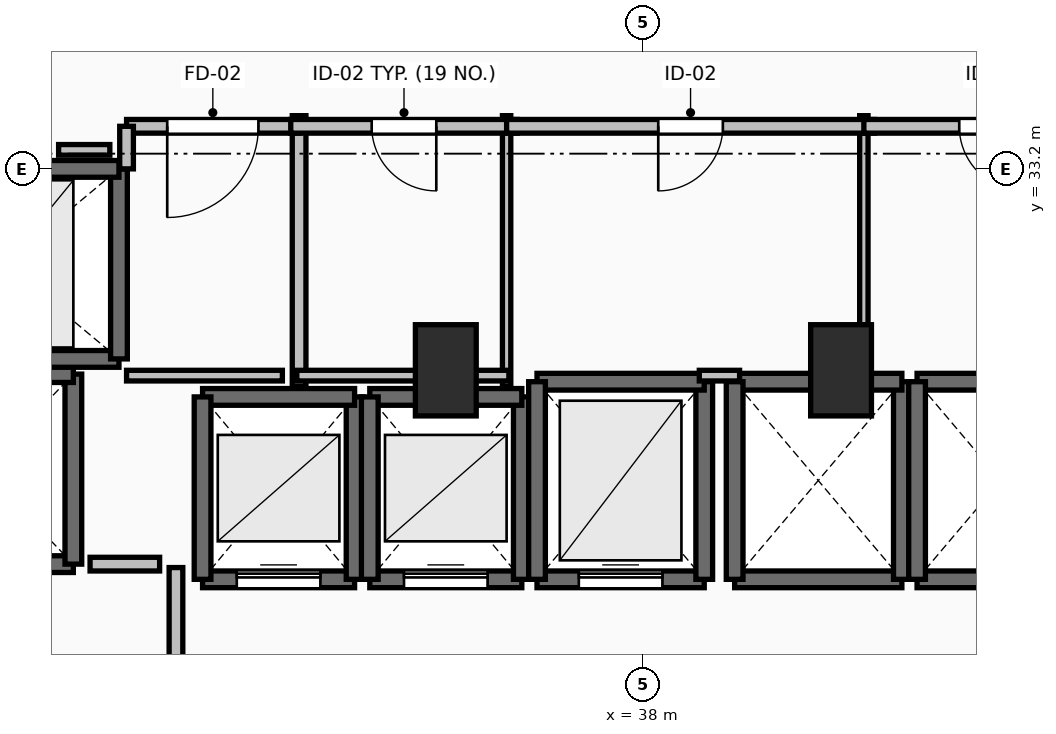
"""IFC4 building model, lengths in metres.
Left out: names, types, materials, properties, quantities, classifications, styles, units other than length and angle.
Written with IfcOpenShell. Run it as: python <this file> out.ifc"""

import sys

from ifc_helpers import new_model, si_unit, direction, frame, frame_2d, origin, origin_2d, place, context, subcontext, project, spatial, rectangle, extrude, element, fill, save


model = new_model("IFC4")
c1 = context("Model", 3, precision=1e-05, world=origin(), true_north=direction((0.0, 1.0)))
c2 = subcontext(c1, "Body", "Model", "MODEL_VIEW")
j1 = project(units=[si_unit("LENGTHUNIT", "METRE"), si_unit("PLANEANGLEUNIT", "RADIAN")], contexts=[c1])
p1 = place(None, origin())
s1 = spatial("IfcSite", under=j1, at=p1, CompositionType="ELEMENT")
p2 = place(p1, origin())
s2 = spatial("IfcBuilding", under=s1, at=p2, CompositionType="ELEMENT")
p3 = place(p2, frame((0.0, 0.0, 27.5)))
s3 = spatial("IfcBuildingStorey", under=s2, at=p3, CompositionType="ELEMENT", Elevation=27.5)
for number, where, z_axis, x_axis in (
    (1, (35.4, 30.55, 0.0), (0.0, 0.0, 1.0), (1.0, 0.0, 0.0)),
    (2, (40.6, 30.55, 0.0), (0.0, 0.0, 1.0), (1.0, 0.0, 0.0)),
):
    element("IfcColumn", number, at=place(p3, frame(where, z_axis=z_axis, x_axis=x_axis)), inside=s3, PredefinedType="PILASTER", context=c2, shape_type="SweptSolid", body=[
        extrude(rectangle(XDim=0.8, YDim=1.2, at=origin_2d()), origin(), (0.0, 0.0, 1.0), 3.5),
    ])
p4 = place(p3, frame((32.2, 27.8, 0.0), z_axis=(0.0, 0.0, 1.0), x_axis=(1.0, 0.0, 0.0)))
e3 = element("IfcWall", 3, at=p4, inside=s3, PredefinedType="SOLIDWALL", context=c2, shape_type="SweptSolid", body=[
    extrude(rectangle(XDim=2.0, YDim=0.22, at=frame_2d((1.0, 0.0))), origin(), (0.0, 0.0, 1.0), 3.24),
])
p5 = place(p4, frame((0.45, 0.0, 0.0)))
e4 = element("IfcOpeningElement", 4, at=p5, cuts=e3, PredefinedType="OPENING", context=c2, shape_type="SweptSolid", body=[
    extrude(rectangle(XDim=1.1, YDim=2.2, at=frame_2d((0.55, 1.1))), frame((0.0, 0.125, 0.0), z_axis=(0.0, -1.0, 0.0), x_axis=(1.0, 0.0, 0.0)), (0.0, 0.0, 1.0), 0.25),
])
p6 = place(p3, frame((34.2, 27.8, 0.0), z_axis=(0.0, 0.0, 1.0), x_axis=(0.0, 1.0, 0.0)))
e5 = element("IfcWall", 5, at=p6, inside=s3, PredefinedType="SOLIDWALL", context=c2, shape_type="SweptSolid", body=[
    extrude(rectangle(XDim=2.4, YDim=0.22, at=frame_2d((1.2, 0.0))), origin(), (0.0, 0.0, 1.0), 3.24),
])
p7 = place(p3, frame((34.2, 30.2, 0.0), z_axis=(0.0, 0.0, 1.0), x_axis=(-1.0, 0.0, 0.0)))
e6 = element("IfcWall", 6, at=p7, inside=s3, PredefinedType="SOLIDWALL", context=c2, shape_type="SweptSolid", body=[
    extrude(rectangle(XDim=2.0, YDim=0.22, at=frame_2d((1.0, 0.0))), origin(), (0.0, 0.0, 1.0), 3.24),
])
p8 = place(p3, frame((32.2, 30.2, 0.0), z_axis=(0.0, 0.0, 1.0), x_axis=(0.0, -1.0, 0.0)))
e7 = element("IfcWall", 7, at=p8, inside=s3, PredefinedType="SOLIDWALL", context=c2, shape_type="SweptSolid", body=[
    extrude(rectangle(XDim=2.4, YDim=0.22, at=frame_2d((1.2, 0.0))), origin(), (0.0, 0.0, 1.0), 3.24),
])
p9 = place(p3, frame((34.4, 27.8, 0.0), z_axis=(0.0, 0.0, 1.0), x_axis=(1.0, 0.0, 0.0)))
e8 = element("IfcWall", 8, at=p9, inside=s3, PredefinedType="SOLIDWALL", context=c2, shape_type="SweptSolid", body=[
    extrude(rectangle(XDim=2.0, YDim=0.22, at=frame_2d((1.0, 0.0))), origin(), (0.0, 0.0, 1.0), 3.24),
])
p10 = place(p9, frame((0.45, 0.0, 0.0)))
e9 = element("IfcOpeningElement", 9, at=p10, cuts=e8, PredefinedType="OPENING", context=c2, shape_type="SweptSolid", body=[
    extrude(rectangle(XDim=1.1, YDim=2.2, at=frame_2d((0.55, 1.1))), frame((0.0, 0.125, 0.0), z_axis=(0.0, -1.0, 0.0), x_axis=(1.0, 0.0, 0.0)), (0.0, 0.0, 1.0), 0.25),
])
p11 = place(p3, frame((36.4, 27.8, 0.0), z_axis=(0.0, 0.0, 1.0), x_axis=(0.0, 1.0, 0.0)))
e10 = element("IfcWall", 10, at=p11, inside=s3, PredefinedType="SOLIDWALL", context=c2, shape_type="SweptSolid", body=[
    extrude(rectangle(XDim=2.4, YDim=0.22, at=frame_2d((1.2, 0.0))), origin(), (0.0, 0.0, 1.0), 3.24),
])
p12 = place(p3, frame((36.4, 30.2, 0.0), z_axis=(0.0, 0.0, 1.0), x_axis=(-1.0, 0.0, 0.0)))
e11 = element("IfcWall", 11, at=p12, inside=s3, PredefinedType="SOLIDWALL", context=c2, shape_type="SweptSolid", body=[
    extrude(rectangle(XDim=2.0, YDim=0.22, at=frame_2d((1.0, 0.0))), origin(), (0.0, 0.0, 1.0), 3.24),
])
p13 = place(p3, frame((34.4, 30.2, 0.0), z_axis=(0.0, 0.0, 1.0), x_axis=(0.0, -1.0, 0.0)))
e12 = element("IfcWall", 12, at=p13, inside=s3, PredefinedType="SOLIDWALL", context=c2, shape_type="SweptSolid", body=[
    extrude(rectangle(XDim=2.4, YDim=0.22, at=frame_2d((1.2, 0.0))), origin(), (0.0, 0.0, 1.0), 3.24),
])
p14 = place(p3, frame((36.6, 27.8, 0.0), z_axis=(0.0, 0.0, 1.0), x_axis=(1.0, 0.0, 0.0)))
e13 = element("IfcWall", 13, at=p14, inside=s3, PredefinedType="SOLIDWALL", context=c2, shape_type="SweptSolid", body=[
    extrude(rectangle(XDim=2.2, YDim=0.22, at=frame_2d((1.1, 0.0))), origin(), (0.0, 0.0, 1.0), 3.24),
])
p15 = place(p14, frame((0.55, 0.0, 0.0)))
e14 = element("IfcOpeningElement", 14, at=p15, cuts=e13, PredefinedType="OPENING", context=c2, shape_type="SweptSolid", body=[
    extrude(rectangle(XDim=1.1, YDim=2.2, at=frame_2d((0.55, 1.1))), frame((0.0, 0.125, 0.0), z_axis=(0.0, -1.0, 0.0), x_axis=(1.0, 0.0, 0.0)), (0.0, 0.0, 1.0), 0.25),
])
p16 = place(p3, frame((38.8, 27.8, 0.0), z_axis=(0.0, 0.0, 1.0), x_axis=(0.0, 1.0, 0.0)))
e15 = element("IfcWall", 15, at=p16, inside=s3, PredefinedType="SOLIDWALL", context=c2, shape_type="SweptSolid", body=[
    extrude(rectangle(XDim=2.6, YDim=0.22, at=frame_2d((1.3, 0.0))), origin(), (0.0, 0.0, 1.0), 3.24),
])
p17 = place(p3, frame((38.8, 30.4, 0.0), z_axis=(0.0, 0.0, 1.0), x_axis=(-1.0, 0.0, 0.0)))
e16 = element("IfcWall", 16, at=p17, inside=s3, PredefinedType="SOLIDWALL", context=c2, shape_type="SweptSolid", body=[
    extrude(rectangle(XDim=2.2, YDim=0.22, at=frame_2d((1.1, 0.0))), origin(), (0.0, 0.0, 1.0), 3.24),
])
p18 = place(p3, frame((36.6, 30.4, 0.0), z_axis=(0.0, 0.0, 1.0), x_axis=(0.0, -1.0, 0.0)))
e17 = element("IfcWall", 17, at=p18, inside=s3, PredefinedType="SOLIDWALL", context=c2, shape_type="SweptSolid", body=[
    extrude(rectangle(XDim=2.6, YDim=0.22, at=frame_2d((1.3, 0.0))), origin(), (0.0, 0.0, 1.0), 3.24),
])
p19 = place(p3, frame((39.2, 27.8, 0.0), z_axis=(0.0, 0.0, 1.0), x_axis=(1.0, 0.0, 0.0)))
e18 = element("IfcWall", 18, at=p19, inside=s3, PredefinedType="SOLIDWALL", context=c2, shape_type="SweptSolid", body=[
    extrude(rectangle(XDim=2.2, YDim=0.22, at=frame_2d((1.1, 0.0))), origin(), (0.0, 0.0, 1.0), 3.24),
])
p20 = place(p3, frame((41.4, 27.8, 0.0), z_axis=(0.0, 0.0, 1.0), x_axis=(0.0, 1.0, 0.0)))
e19 = element("IfcWall", 19, at=p20, inside=s3, PredefinedType="SOLIDWALL", context=c2, shape_type="SweptSolid", body=[
    extrude(rectangle(XDim=2.6, YDim=0.22, at=frame_2d((1.3, 0.0))), origin(), (0.0, 0.0, 1.0), 3.24),
])
p21 = place(p3, frame((41.4, 30.4, 0.0), z_axis=(0.0, 0.0, 1.0), x_axis=(-1.0, 0.0, 0.0)))
e20 = element("IfcWall", 20, at=p21, inside=s3, PredefinedType="SOLIDWALL", context=c2, shape_type="SweptSolid", body=[
    extrude(rectangle(XDim=2.2, YDim=0.22, at=frame_2d((1.1, 0.0))), origin(), (0.0, 0.0, 1.0), 3.24),
])
p22 = place(p3, frame((39.2, 30.4, 0.0), z_axis=(0.0, 0.0, 1.0), x_axis=(0.0, -1.0, 0.0)))
e21 = element("IfcWall", 21, at=p22, inside=s3, PredefinedType="SOLIDWALL", context=c2, shape_type="SweptSolid", body=[
    extrude(rectangle(XDim=2.6, YDim=0.22, at=frame_2d((1.3, 0.0))), origin(), (0.0, 0.0, 1.0), 3.24),
])
for number, where, z_axis, x_axis in (
    (22, (41.6, 27.8, 0.0), (0.0, 0.0, 1.0), (1.0, 0.0, 0.0)),
    (23, (43.8, 30.4, 0.0), (0.0, 0.0, 1.0), (-1.0, 0.0, 0.0)),
):
    element("IfcWall", number, at=place(p3, frame(where, z_axis=z_axis, x_axis=x_axis)), inside=s3, PredefinedType="SOLIDWALL", context=c2, shape_type="SweptSolid", body=[
        extrude(rectangle(XDim=2.2, YDim=0.22, at=frame_2d((1.1, 0.0))), origin(), (0.0, 0.0, 1.0), 3.24),
    ])
p23 = place(p3, frame((41.6, 30.4, 0.0), z_axis=(0.0, 0.0, 1.0), x_axis=(0.0, -1.0, 0.0)))
e24 = element("IfcWall", 24, at=p23, inside=s3, PredefinedType="SOLIDWALL", context=c2, shape_type="SweptSolid", body=[
    extrude(rectangle(XDim=2.6, YDim=0.22, at=frame_2d((1.3, 0.0))), origin(), (0.0, 0.0, 1.0), 3.24),
])
p24 = place(p3, frame((28.1, 28.0, 0.0), z_axis=(0.0, 0.0, 1.0), x_axis=(1.0, 0.0, 0.0)))
e25 = element("IfcWall", 25, at=p24, inside=s3, PredefinedType="SHEAR", context=c2, shape_type="SweptSolid", body=[
    extrude(rectangle(XDim=2.4, YDim=0.22, at=frame_2d((1.2, 0.0))), origin(), (0.0, 0.0, 1.0), 3.24),
])
p25 = place(p24, frame((0.6, 0.0, 0.0)))
e26 = element("IfcOpeningElement", 26, at=p25, cuts=e25, PredefinedType="OPENING", context=c2, shape_type="SweptSolid", body=[
    extrude(rectangle(XDim=1.2, YDim=2.2, at=frame_2d((0.6, 1.1))), frame((0.0, 0.125, 0.0), z_axis=(0.0, -1.0, 0.0), x_axis=(1.0, 0.0, 0.0)), (0.0, 0.0, 1.0), 0.25),
])
p26 = place(p3, frame((30.5, 28.0, 0.0), z_axis=(0.0, 0.0, 1.0), x_axis=(0.0, 1.0, 0.0)))
e27 = element("IfcWall", 27, at=p26, inside=s3, PredefinedType="SHEAR", context=c2, shape_type="SweptSolid", body=[
    extrude(rectangle(XDim=2.5, YDim=0.22, at=frame_2d((1.25, 0.0))), origin(), (0.0, 0.0, 1.0), 3.24),
])
p27 = place(p3, frame((30.5, 30.5, 0.0), z_axis=(0.0, 0.0, 1.0), x_axis=(-1.0, 0.0, 0.0)))
e28 = element("IfcWall", 28, at=p27, inside=s3, PredefinedType="SHEAR", context=c2, shape_type="SweptSolid", body=[
    extrude(rectangle(XDim=2.4, YDim=0.22, at=frame_2d((1.2, 0.0))), origin(), (0.0, 0.0, 1.0), 3.24),
])
p28 = place(p3, frame((28.1, 30.7, 0.0), z_axis=(0.0, 0.0, 1.0), x_axis=(1.0, 0.0, 0.0)))
e29 = element("IfcWall", 29, at=p28, inside=s3, PredefinedType="SOLIDWALL", context=c2, shape_type="SweptSolid", body=[
    extrude(rectangle(XDim=3.0, YDim=0.22, at=frame_2d((1.5, 0.0))), origin(), (0.0, 0.0, 1.0), 3.24),
])
p29 = place(p3, frame((31.1, 30.7, 0.0), z_axis=(0.0, 0.0, 1.0), x_axis=(0.0, 1.0, 0.0)))
e30 = element("IfcWall", 30, at=p29, inside=s3, PredefinedType="SOLIDWALL", context=c2, shape_type="SweptSolid", body=[
    extrude(rectangle(XDim=2.5, YDim=0.22, at=frame_2d((1.25, 0.0))), origin(), (0.0, 0.0, 1.0), 3.24),
])
p30 = place(p3, frame((31.1, 33.2, 0.0), z_axis=(0.0, 0.0, 1.0), x_axis=(-1.0, 0.0, 0.0)))
e31 = element("IfcWall", 31, at=p30, inside=s3, PredefinedType="SOLIDWALL", context=c2, shape_type="SweptSolid", body=[
    extrude(rectangle(XDim=3.0, YDim=0.22, at=frame_2d((1.5, 0.0))), origin(), (0.0, 0.0, 1.0), 3.24),
])
p31 = place(p30, frame((0.9, 0.0, 0.0)))
e32 = element("IfcOpeningElement", 32, at=p31, cuts=e31, PredefinedType="OPENING", context=c2, shape_type="SweptSolid", body=[
    extrude(rectangle(XDim=1.2, YDim=2.2, at=frame_2d((0.6, 1.1))), frame((0.0, 0.125, 0.0), z_axis=(0.0, -1.0, 0.0), x_axis=(1.0, 0.0, 0.0)), (0.0, 0.0, 1.0), 0.25),
])
p32 = place(p3, frame((31.85, 24.045, 0.0), z_axis=(0.0, 0.0, 1.0), x_axis=(0.0, 1.0, 0.0)))
e33 = element("IfcWall", 33, at=p32, inside=s3, PredefinedType="PARTITIONING", context=c2, shape_type="SweptSolid", body=[
    extrude(rectangle(XDim=3.91, YDim=0.18, at=frame_2d((1.955, 0.0))), origin(), (0.0, 0.0, 1.0), 3.24),
])
p33 = place(p32, frame((1.355, 0.0, 0.0)))
e34 = element("IfcOpeningElement", 34, at=p33, cuts=e33, PredefinedType="OPENING", context=c2, shape_type="SweptSolid", body=[
    extrude(rectangle(XDim=1.2, YDim=2.15, at=frame_2d((0.6, 1.075))), frame((0.0, 0.105, 0.0), z_axis=(0.0, -1.0, 0.0), x_axis=(1.0, 0.0, 0.0)), (0.0, 0.0, 1.0), 0.21),
])
p34 = place(p3, frame((33.47, 30.34, 0.0), z_axis=(0.0, 0.0, 1.0), x_axis=(0.0, 1.0, 0.0)))
e35 = element("IfcWall", 35, at=p34, inside=s3, PredefinedType="PARTITIONING", context=c2, shape_type="SweptSolid", body=[
    extrude(rectangle(XDim=3.56, YDim=0.18, at=frame_2d((1.78, 0.0))), origin(), (0.0, 0.0, 1.0), 3.24),
])
p35 = place(p3, frame((33.47, 33.76, 0.0), z_axis=(0.0, 0.0, 1.0), x_axis=(-1.0, 0.0, 0.0)))
e36 = element("IfcWall", 36, at=p35, inside=s3, PredefinedType="PARTITIONING", context=c2, shape_type="SweptSolid", body=[
    extrude(rectangle(XDim=2.27, YDim=0.18, at=frame_2d((1.135, 0.0))), origin(), (0.0, 0.0, 1.0), 3.24),
])
p36 = place(p35, frame((0.535, 0.0, 0.0)))
e37 = element("IfcOpeningElement", 37, at=p36, cuts=e36, PredefinedType="OPENING", context=c2, shape_type="SweptSolid", body=[
    extrude(rectangle(XDim=1.2, YDim=2.15, at=frame_2d((0.6, 1.075))), frame((0.0, 0.105, 0.0), z_axis=(0.0, -1.0, 0.0), x_axis=(1.0, 0.0, 0.0)), (0.0, 0.0, 1.0), 0.21),
])
p37 = place(p3, frame((31.2, 33.76, 0.0), z_axis=(0.0, 0.0, 1.0), x_axis=(0.0, -1.0, 0.0)))
e38 = element("IfcWall", 38, at=p37, inside=s3, PredefinedType="PARTITIONING", context=c2, shape_type="SweptSolid", body=[
    extrude(rectangle(XDim=0.56, YDim=0.18, at=frame_2d((0.28, 0.0))), origin(), (0.0, 0.0, 1.0), 3.24),
])
p38 = place(p3, frame((36.2, 30.34, 0.0), z_axis=(0.0, 0.0, 1.0), x_axis=(0.0, 1.0, 0.0)))
e39 = element("IfcWall", 39, at=p38, inside=s3, PredefinedType="PARTITIONING", context=c2, shape_type="SweptSolid", body=[
    extrude(rectangle(XDim=3.56, YDim=0.11, at=frame_2d((1.78, 0.0))), origin(), (0.0, 0.0, 1.0), 2.432),
])
p39 = place(p3, frame((36.34, 33.76, 0.0), z_axis=(0.0, 0.0, 1.0), x_axis=(-1.0, 0.0, 0.0)))
e40 = element("IfcWall", 40, at=p39, inside=s3, PredefinedType="PARTITIONING", context=c2, shape_type="SweptSolid", body=[
    extrude(rectangle(XDim=2.98, YDim=0.18, at=frame_2d((1.49, 0.0))), origin(), (0.0, 0.0, 1.0), 3.24),
])
p40 = place(p39, frame((1.065, 0.0, 0.0)))
e41 = element("IfcOpeningElement", 41, at=p40, cuts=e40, PredefinedType="OPENING", context=c2, shape_type="SweptSolid", body=[
    extrude(rectangle(XDim=0.85, YDim=2.1, at=frame_2d((0.425, 1.05))), frame((0.0, 0.105, 0.0), z_axis=(0.0, -1.0, 0.0), x_axis=(1.0, 0.0, 0.0)), (0.0, 0.0, 1.0), 0.21),
])
p41 = place(p3, frame((40.9, 30.34, 0.0), z_axis=(0.0, 0.0, 1.0), x_axis=(0.0, 1.0, 0.0)))
e42 = element("IfcWall", 42, at=p41, inside=s3, PredefinedType="PARTITIONING", context=c2, shape_type="SweptSolid", body=[
    extrude(rectangle(XDim=3.56, YDim=0.11, at=frame_2d((1.78, 0.0))), origin(), (0.0, 0.0, 1.0), 3.24),
])
p42 = place(p3, frame((41.04, 33.76, 0.0), z_axis=(0.0, 0.0, 1.0), x_axis=(-1.0, 0.0, 0.0)))
e43 = element("IfcWall", 43, at=p42, inside=s3, PredefinedType="PARTITIONING", context=c2, shape_type="SweptSolid", body=[
    extrude(rectangle(XDim=4.84, YDim=0.18, at=frame_2d((2.42, 0.0))), origin(), (0.0, 0.0, 1.0), 3.24),
])
p43 = place(p42, frame((1.995, 0.0, 0.0)))
e44 = element("IfcOpeningElement", 44, at=p43, cuts=e43, PredefinedType="OPENING", context=c2, shape_type="SweptSolid", body=[
    extrude(rectangle(XDim=0.85, YDim=2.1, at=frame_2d((0.425, 1.05))), frame((0.0, 0.105, 0.0), z_axis=(0.0, -1.0, 0.0), x_axis=(1.0, 0.0, 0.0)), (0.0, 0.0, 1.0), 0.21),
])
p44 = place(p3, frame((44.26, 33.76, 0.0), z_axis=(0.0, 0.0, 1.0), x_axis=(-1.0, 0.0, 0.0)))
e45 = element("IfcWall", 45, at=p44, inside=s3, PredefinedType="PARTITIONING", context=c2, shape_type="SweptSolid", body=[
    extrude(rectangle(XDim=3.36, YDim=0.18, at=frame_2d((1.68, 0.0))), origin(), (0.0, 0.0, 1.0), 3.24),
])
p45 = place(p44, frame((1.255, 0.0, 0.0)))
e46 = element("IfcOpeningElement", 46, at=p45, cuts=e45, PredefinedType="OPENING", context=c2, shape_type="SweptSolid", body=[
    extrude(rectangle(XDim=0.85, YDim=2.1, at=frame_2d((0.425, 1.05))), frame((0.0, 0.105, 0.0), z_axis=(0.0, -1.0, 0.0), x_axis=(1.0, 0.0, 0.0)), (0.0, 0.0, 1.0), 0.21),
])
p46 = place(p3, frame((31.635, 28.0, 0.0), z_axis=(0.0, 0.0, 1.0), x_axis=(-1.0, 0.0, 0.0)))
e47 = element("IfcWall", 47, at=p46, inside=s3, PredefinedType="PARTITIONING", context=c2, shape_type="SweptSolid", body=[
    extrude(rectangle(XDim=0.915, YDim=0.18, at=frame_2d((0.458, 0.0))), origin(), (0.0, 0.0, 1.0), 3.24),
])
p47 = place(p3, frame((31.2, 30.48, 0.0), z_axis=(0.0, 0.0, 1.0), x_axis=(1.0, 0.0, 0.0)))
e48 = element("IfcWall", 48, at=p47, inside=s3, PredefinedType="PARTITIONING", context=c2, shape_type="SweptSolid", body=[
    extrude(rectangle(XDim=2.05, YDim=0.14, at=frame_2d((1.025, 0.0))), origin(), (0.0, 0.0, 1.0), 3.24),
])
p48 = place(p3, frame((33.44, 30.48, 0.0), z_axis=(0.0, 0.0, 1.0), x_axis=(1.0, 0.0, 0.0)))
e49 = element("IfcWall", 49, at=p48, inside=s3, PredefinedType="PARTITIONING", context=c2, shape_type="SweptSolid", body=[
    extrude(rectangle(XDim=2.79, YDim=0.14, at=frame_2d((1.395, 0.0))), origin(), (0.0, 0.0, 1.0), 2.432),
])
p49 = place(p3, frame((38.735, 30.48, 0.0), z_axis=(0.0, 0.0, 1.0), x_axis=(1.0, 0.0, 0.0)))
e50 = element("IfcWall", 50, at=p49, inside=s3, PredefinedType="PARTITIONING", context=c2, shape_type="SweptSolid", body=[
    extrude(rectangle(XDim=0.53, YDim=0.14, at=frame_2d((0.265, 0.0))), origin(), (0.0, 0.0, 1.0), 2.432),
])
p50 = place(p3, frame((30.306, 33.45, 0.0), z_axis=(0.0, 0.0, 1.0), x_axis=(1.0, 0.0, 0.0)))
e51 = element("IfcWall", 51, at=p50, inside=s3, PredefinedType="PARTITIONING", context=c2, shape_type="SweptSolid", body=[
    extrude(rectangle(XDim=0.674, YDim=0.14, at=frame_2d((0.337, 0.0))), origin(), (0.0, 0.0, 1.0), 3.24),
])
p51 = place(p5, origin())
e52 = element("IfcDoor", 52, at=p51, inside=s3, OperationType="SLIDING_TO_LEFT", PredefinedType="DOOR", context=c2, shape_type="SweptSolid", body=[
    extrude(rectangle(XDim=1.1, YDim=2.2, at=frame_2d((0.55, 1.1))), frame((0.0, 0.025, 0.0), z_axis=(0.0, -1.0, 0.0), x_axis=(1.0, 0.0, 0.0)), (0.0, 0.0, 1.0), 0.05),
])
fill(e4, e52)
p52 = place(p10, origin())
e53 = element("IfcDoor", 53, at=p52, inside=s3, OperationType="SLIDING_TO_LEFT", PredefinedType="DOOR", context=c2, shape_type="SweptSolid", body=[
    extrude(rectangle(XDim=1.1, YDim=2.2, at=frame_2d((0.55, 1.1))), frame((0.0, 0.025, 0.0), z_axis=(0.0, -1.0, 0.0), x_axis=(1.0, 0.0, 0.0)), (0.0, 0.0, 1.0), 0.05),
])
fill(e9, e53)
p53 = place(p15, origin())
e54 = element("IfcDoor", 54, at=p53, inside=s3, OperationType="SLIDING_TO_LEFT", PredefinedType="DOOR", context=c2, shape_type="SweptSolid", body=[
    extrude(rectangle(XDim=1.1, YDim=2.2, at=frame_2d((0.55, 1.1))), frame((0.0, 0.025, 0.0), z_axis=(0.0, -1.0, 0.0), x_axis=(1.0, 0.0, 0.0)), (0.0, 0.0, 1.0), 0.05),
])
fill(e14, e54)
p54 = place(p36, origin())
e55 = element("IfcDoor", 55, at=p54, inside=s3, OperationType="SINGLE_SWING_RIGHT", PredefinedType="DOOR", context=c2, shape_type="SweptSolid", body=[
    extrude(rectangle(XDim=1.2, YDim=2.15, at=frame_2d((0.6, 1.075))), frame((0.0, 0.025, 0.0), z_axis=(0.0, -1.0, 0.0), x_axis=(1.0, 0.0, 0.0)), (0.0, 0.0, 1.0), 0.05),
])
fill(e37, e55)
p55 = place(p40, origin())
e56 = element("IfcDoor", 56, at=p55, inside=s3, OperationType="SINGLE_SWING_LEFT", PredefinedType="DOOR", context=c2, shape_type="SweptSolid", body=[
    extrude(rectangle(XDim=0.85, YDim=2.1, at=frame_2d((0.425, 1.05))), frame((0.0, 0.025, 0.0), z_axis=(0.0, -1.0, 0.0), x_axis=(1.0, 0.0, 0.0)), (0.0, 0.0, 1.0), 0.05),
])
fill(e41, e56)
p56 = place(p43, origin())
e57 = element("IfcDoor", 57, at=p56, inside=s3, OperationType="SINGLE_SWING_RIGHT", PredefinedType="DOOR", context=c2, shape_type="SweptSolid", body=[
    extrude(rectangle(XDim=0.85, YDim=2.1, at=frame_2d((0.425, 1.05))), frame((0.0, 0.025, 0.0), z_axis=(0.0, -1.0, 0.0), x_axis=(1.0, 0.0, 0.0)), (0.0, 0.0, 1.0), 0.05),
])
fill(e44, e57)
p57 = place(p45, origin())
e58 = element("IfcDoor", 58, at=p57, inside=s3, OperationType="SINGLE_SWING_LEFT", PredefinedType="DOOR", context=c2, shape_type="SweptSolid", body=[
    extrude(rectangle(XDim=0.85, YDim=2.1, at=frame_2d((0.425, 1.05))), frame((0.0, 0.025, 0.0), z_axis=(0.0, -1.0, 0.0), x_axis=(1.0, 0.0, 0.0)), (0.0, 0.0, 1.0), 0.05),
])
fill(e46, e58)
save(model, sys.argv[1])
